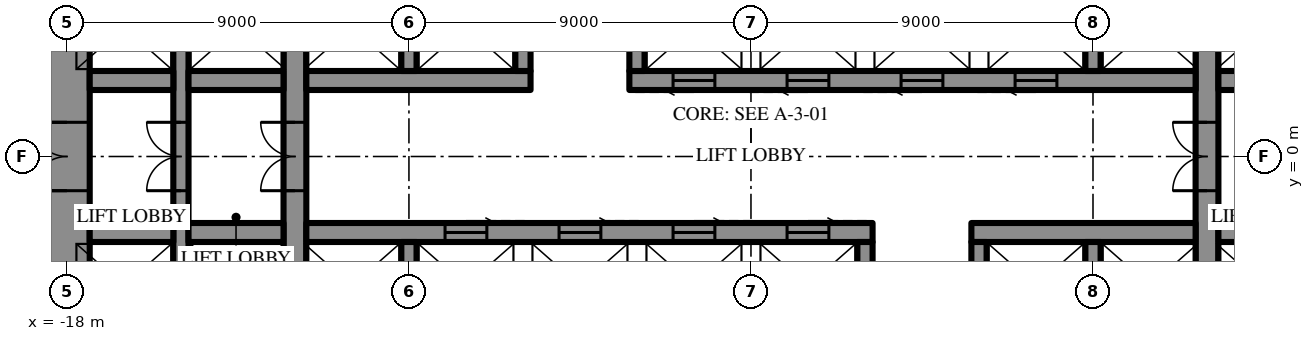
"""IFC4 building model, lengths in metres.
Left out: names, types, materials, properties, quantities, classifications, styles, units other than length and angle.
Written with IfcOpenShell. Run it as: python <this file> out.ifc"""

import sys

from ifc_helpers import new_model, si_unit, direction, frame, frame_2d, origin, place, context, subcontext, project, spatial, rectangle, extrude, element, fill, save


model = new_model("IFC4")
c1 = context("Model", 3, precision=1e-05, world=origin(), true_north=direction((0.0, 1.0)))
c2 = subcontext(c1, "Body", "Model", "MODEL_VIEW")
j1 = project(units=[si_unit("LENGTHUNIT", "METRE"), si_unit("PLANEANGLEUNIT", "RADIAN")], contexts=[c1])
p1 = place(None, origin())
s1 = spatial("IfcSite", under=j1, at=p1, CompositionType="ELEMENT")
p2 = place(p1, origin())
s2 = spatial("IfcBuilding", under=s1, at=p2, CompositionType="ELEMENT")
p3 = place(p2, frame((0.0, 0.0, 48.7)))
s3 = spatial("IfcBuildingStorey", under=s2, at=p3, CompositionType="ELEMENT", Elevation=48.7)
p4 = place(p3, frame((-18.0, 10.7, 0.0), z_axis=(0.0, 0.0, 1.0), x_axis=(0.0, -1.0, 0.0)))
e1 = element("IfcWall", 1, at=p4, inside=s3, PredefinedType="SHEAR", context=c2, shape_type="SweptSolid", body=[
    extrude(rectangle(XDim=21.4, YDim=1.2, at=frame_2d((10.7, 0.0))), origin(), (0.0, 0.0, 1.0), 4.2),
])
p5 = place(p4, frame((9.8, 0.0, 0.0)))
e2 = element("IfcOpeningElement", 2, at=p5, cuts=e1, PredefinedType="OPENING", context=c2, shape_type="SweptSolid", body=[
    extrude(rectangle(XDim=1.8, YDim=2.4, at=frame_2d((0.9, 1.2))), frame((0.0, 0.61, 0.0), z_axis=(0.0, -1.0, 0.0), x_axis=(1.0, 0.0, 0.0)), (0.0, 0.0, 1.0), 1.22),
])
p6 = place(p3, frame((12.0, -10.7, 0.0), z_axis=(0.0, 0.0, 1.0), x_axis=(0.0, 1.0, 0.0)))
e3 = element("IfcWall", 3, at=p6, inside=s3, PredefinedType="SHEAR", context=c2, shape_type="SweptSolid", body=[
    extrude(rectangle(XDim=21.4, YDim=0.6, at=frame_2d((10.7, 0.0))), origin(), (0.0, 0.0, 1.0), 4.2),
])
p7 = place(p6, frame((9.8, 0.0, 0.0)))
e4 = element("IfcOpeningElement", 4, at=p7, cuts=e3, PredefinedType="OPENING", context=c2, shape_type="SweptSolid", body=[
    extrude(rectangle(XDim=1.8, YDim=2.4, at=frame_2d((0.9, 1.2))), frame((0.0, 0.31, 0.0), z_axis=(0.0, -1.0, 0.0), x_axis=(1.0, 0.0, 0.0)), (0.0, 0.0, 1.0), 0.62),
])
p8 = place(p3, frame((-12.0, -10.7, 0.0), z_axis=(0.0, 0.0, 1.0), x_axis=(0.0, 1.0, 0.0)))
e5 = element("IfcWall", 5, at=p8, inside=s3, PredefinedType="SHEAR", context=c2, shape_type="SweptSolid", body=[
    extrude(rectangle(XDim=21.4, YDim=0.6, at=frame_2d((10.7, 0.0))), origin(), (0.0, 0.0, 1.0), 4.2),
])
p9 = place(p8, frame((9.8, 0.0, 0.0)))
e6 = element("IfcOpeningElement", 6, at=p9, cuts=e5, PredefinedType="OPENING", context=c2, shape_type="SweptSolid", body=[
    extrude(rectangle(XDim=1.8, YDim=2.4, at=frame_2d((0.9, 1.2))), frame((0.0, 0.31, 0.0), z_axis=(0.0, -1.0, 0.0), x_axis=(1.0, 0.0, 0.0)), (0.0, 0.0, 1.0), 0.62),
])
p10 = place(p3, frame((-15.0, -10.7, 0.0), z_axis=(0.0, 0.0, 1.0), x_axis=(0.0, 1.0, 0.0)))
e7 = element("IfcWall", 7, at=p10, inside=s3, PredefinedType="SHEAR", context=c2, shape_type="SweptSolid", body=[
    extrude(rectangle(XDim=21.4, YDim=0.4, at=frame_2d((10.7, 0.0))), origin(), (0.0, 0.0, 1.0), 4.2),
])
p11 = place(p10, frame((9.8, 0.0, 0.0)))
e8 = element("IfcOpeningElement", 8, at=p11, cuts=e7, PredefinedType="OPENING", context=c2, shape_type="SweptSolid", body=[
    extrude(rectangle(XDim=1.8, YDim=2.4, at=frame_2d((0.9, 1.2))), frame((0.0, 0.21, 0.0), z_axis=(0.0, -1.0, 0.0), x_axis=(1.0, 0.0, 0.0)), (0.0, 0.0, 1.0), 0.42),
])
p12 = place(p3, frame((-17.4, 2.0, 0.0), z_axis=(0.0, 0.0, 1.0), x_axis=(1.0, 0.0, 0.0)))
e9 = element("IfcWall", 9, at=p12, inside=s3, PredefinedType="SHEAR", context=c2, shape_type="SweptSolid", body=[
    extrude(rectangle(XDim=2.2, YDim=0.5, at=frame_2d((1.1, 0.0))), origin(), (0.0, 0.0, 1.0), 4.2),
])
p13 = place(p3, frame((-14.8, 2.0, 0.0), z_axis=(0.0, 0.0, 1.0), x_axis=(1.0, 0.0, 0.0)))
e10 = element("IfcWall", 10, at=p13, inside=s3, PredefinedType="SHEAR", context=c2, shape_type="SweptSolid", body=[
    extrude(rectangle(XDim=2.5, YDim=0.5, at=frame_2d((1.25, 0.0))), origin(), (0.0, 0.0, 1.0), 4.2),
])
p14 = place(p3, frame((-11.7, 2.0, 0.0), z_axis=(0.0, 0.0, 1.0), x_axis=(1.0, 0.0, 0.0)))
e11 = element("IfcWall", 11, at=p14, inside=s3, PredefinedType="SHEAR", context=c2, shape_type="SweptSolid", body=[
    extrude(rectangle(XDim=5.9, YDim=0.5, at=frame_2d((2.95, 0.0))), origin(), (0.0, 0.0, 1.0), 4.2),
])
p15 = place(p3, frame((-3.2, 2.0, 0.0), z_axis=(0.0, 0.0, 1.0), x_axis=(1.0, 0.0, 0.0)))
e12 = element("IfcWall", 12, at=p15, inside=s3, PredefinedType="SHEAR", context=c2, shape_type="SweptSolid", body=[
    extrude(rectangle(XDim=14.9, YDim=0.5, at=frame_2d((7.45, 0.0))), origin(), (0.0, 0.0, 1.0), 4.2),
])
p16 = place(p15, frame((1.15, 0.0, 0.0)))
e13 = element("IfcOpeningElement", 13, at=p16, cuts=e12, PredefinedType="OPENING", context=c2, shape_type="SweptSolid", body=[
    extrude(rectangle(XDim=1.1, YDim=2.2, at=frame_2d((0.55, 1.1))), frame((0.0, 0.26, 0.0), z_axis=(0.0, -1.0, 0.0), x_axis=(1.0, 0.0, 0.0)), (0.0, 0.0, 1.0), 0.52),
])
p17 = place(p15, frame((4.15, 0.0, 0.0)))
e14 = element("IfcOpeningElement", 14, at=p17, cuts=e12, PredefinedType="OPENING", context=c2, shape_type="SweptSolid", body=[
    extrude(rectangle(XDim=1.1, YDim=2.2, at=frame_2d((0.55, 1.1))), frame((0.0, 0.26, 0.0), z_axis=(0.0, -1.0, 0.0), x_axis=(1.0, 0.0, 0.0)), (0.0, 0.0, 1.0), 0.52),
])
p18 = place(p15, frame((7.15, 0.0, 0.0)))
e15 = element("IfcOpeningElement", 15, at=p18, cuts=e12, PredefinedType="OPENING", context=c2, shape_type="SweptSolid", body=[
    extrude(rectangle(XDim=1.1, YDim=2.2, at=frame_2d((0.55, 1.1))), frame((0.0, 0.26, 0.0), z_axis=(0.0, -1.0, 0.0), x_axis=(1.0, 0.0, 0.0)), (0.0, 0.0, 1.0), 0.52),
])
p19 = place(p15, frame((10.15, 0.0, 0.0)))
e16 = element("IfcOpeningElement", 16, at=p19, cuts=e12, PredefinedType="OPENING", context=c2, shape_type="SweptSolid", body=[
    extrude(rectangle(XDim=1.1, YDim=2.2, at=frame_2d((0.55, 1.1))), frame((0.0, 0.26, 0.0), z_axis=(0.0, -1.0, 0.0), x_axis=(1.0, 0.0, 0.0)), (0.0, 0.0, 1.0), 0.52),
])
p20 = place(p3, frame((12.3, 2.0, 0.0), z_axis=(0.0, 0.0, 1.0), x_axis=(1.0, 0.0, 0.0)))
e17 = element("IfcWall", 17, at=p20, inside=s3, PredefinedType="SHEAR", context=c2, shape_type="SweptSolid", body=[
    extrude(rectangle(XDim=2.5, YDim=0.5, at=frame_2d((1.25, 0.0))), origin(), (0.0, 0.0, 1.0), 4.2),
])
for number, where, z_axis, x_axis in (
    (18, (-9.0, 2.25, 0.0), (0.0, 0.0, 1.0), (0.0, 1.0, 0.0)),
    (19, (-6.0, 2.25, 0.0), (0.0, 0.0, 1.0), (0.0, 1.0, 0.0)),
    (20, (-3.0, 2.25, 0.0), (0.0, 0.0, 1.0), (0.0, 1.0, 0.0)),
    (21, (9.0, 2.25, 0.0), (0.0, 0.0, 1.0), (0.0, 1.0, 0.0)),
):
    element("IfcWall", number, at=place(p3, frame(where, z_axis=z_axis, x_axis=x_axis)), inside=s3, PredefinedType="SHEAR", context=c2, shape_type="SweptSolid", body=[
        extrude(rectangle(XDim=2.3, YDim=0.4, at=frame_2d((1.15, 0.0))), origin(), (0.0, 0.0, 1.0), 4.2),
    ])
p21 = place(p3, frame((14.8, -2.0, 0.0), z_axis=(0.0, 0.0, 1.0), x_axis=(-1.0, 0.0, 0.0)))
e22 = element("IfcWall", 22, at=p21, inside=s3, PredefinedType="SHEAR", context=c2, shape_type="SweptSolid", body=[
    extrude(rectangle(XDim=2.5, YDim=0.5, at=frame_2d((1.25, 0.0))), origin(), (0.0, 0.0, 1.0), 4.2),
])
p22 = place(p3, frame((11.7, -2.0, 0.0), z_axis=(0.0, 0.0, 1.0), x_axis=(-1.0, 0.0, 0.0)))
e23 = element("IfcWall", 23, at=p22, inside=s3, PredefinedType="SHEAR", context=c2, shape_type="SweptSolid", body=[
    extrude(rectangle(XDim=5.9, YDim=0.5, at=frame_2d((2.95, 0.0))), origin(), (0.0, 0.0, 1.0), 4.2),
])
p23 = place(p3, frame((3.2, -2.0, 0.0), z_axis=(0.0, 0.0, 1.0), x_axis=(-1.0, 0.0, 0.0)))
e24 = element("IfcWall", 24, at=p23, inside=s3, PredefinedType="SHEAR", context=c2, shape_type="SweptSolid", body=[
    extrude(rectangle(XDim=14.9, YDim=0.5, at=frame_2d((7.45, 0.0))), origin(), (0.0, 0.0, 1.0), 4.2),
])
p24 = place(p23, frame((1.15, 0.0, 0.0)))
e25 = element("IfcOpeningElement", 25, at=p24, cuts=e24, PredefinedType="OPENING", context=c2, shape_type="SweptSolid", body=[
    extrude(rectangle(XDim=1.1, YDim=2.2, at=frame_2d((0.55, 1.1))), frame((0.0, 0.26, 0.0), z_axis=(0.0, -1.0, 0.0), x_axis=(1.0, 0.0, 0.0)), (0.0, 0.0, 1.0), 0.52),
])
p25 = place(p23, frame((4.15, 0.0, 0.0)))
e26 = element("IfcOpeningElement", 26, at=p25, cuts=e24, PredefinedType="OPENING", context=c2, shape_type="SweptSolid", body=[
    extrude(rectangle(XDim=1.1, YDim=2.2, at=frame_2d((0.55, 1.1))), frame((0.0, 0.26, 0.0), z_axis=(0.0, -1.0, 0.0), x_axis=(1.0, 0.0, 0.0)), (0.0, 0.0, 1.0), 0.52),
])
p26 = place(p23, frame((7.15, 0.0, 0.0)))
e27 = element("IfcOpeningElement", 27, at=p26, cuts=e24, PredefinedType="OPENING", context=c2, shape_type="SweptSolid", body=[
    extrude(rectangle(XDim=1.1, YDim=2.2, at=frame_2d((0.55, 1.1))), frame((0.0, 0.26, 0.0), z_axis=(0.0, -1.0, 0.0), x_axis=(1.0, 0.0, 0.0)), (0.0, 0.0, 1.0), 0.52),
])
p27 = place(p23, frame((10.15, 0.0, 0.0)))
e28 = element("IfcOpeningElement", 28, at=p27, cuts=e24, PredefinedType="OPENING", context=c2, shape_type="SweptSolid", body=[
    extrude(rectangle(XDim=1.1, YDim=2.2, at=frame_2d((0.55, 1.1))), frame((0.0, 0.26, 0.0), z_axis=(0.0, -1.0, 0.0), x_axis=(1.0, 0.0, 0.0)), (0.0, 0.0, 1.0), 0.52),
])
p28 = place(p3, frame((-12.3, -2.0, 0.0), z_axis=(0.0, 0.0, 1.0), x_axis=(-1.0, 0.0, 0.0)))
e29 = element("IfcWall", 29, at=p28, inside=s3, PredefinedType="SHEAR", context=c2, shape_type="SweptSolid", body=[
    extrude(rectangle(XDim=2.5, YDim=0.5, at=frame_2d((1.25, 0.0))), origin(), (0.0, 0.0, 1.0), 4.2),
])
p29 = place(p3, frame((-15.2, -2.0, 0.0), z_axis=(0.0, 0.0, 1.0), x_axis=(-1.0, 0.0, 0.0)))
e30 = element("IfcWall", 30, at=p29, inside=s3, PredefinedType="SHEAR", context=c2, shape_type="SweptSolid", body=[
    extrude(rectangle(XDim=2.2, YDim=0.5, at=frame_2d((1.1, 0.0))), origin(), (0.0, 0.0, 1.0), 4.2),
])
for number, where, z_axis, x_axis in (
    (31, (9.0, -2.25, 0.0), (0.0, 0.0, 1.0), (0.0, -1.0, 0.0)),
    (32, (6.0, -2.25, 0.0), (0.0, 0.0, 1.0), (0.0, -1.0, 0.0)),
    (33, (3.0, -2.25, 0.0), (0.0, 0.0, 1.0), (0.0, -1.0, 0.0)),
    (34, (-9.0, -2.25, 0.0), (0.0, 0.0, 1.0), (0.0, -1.0, 0.0)),
):
    element("IfcWall", number, at=place(p3, frame(where, z_axis=z_axis, x_axis=x_axis)), inside=s3, PredefinedType="SHEAR", context=c2, shape_type="SweptSolid", body=[
        extrude(rectangle(XDim=2.3, YDim=0.4, at=frame_2d((1.15, 0.0))), origin(), (0.0, 0.0, 1.0), 4.2),
    ])
p30 = place(p5, frame((1.8, 0.0, 0.0), z_axis=(0.0, 0.0, 1.0), x_axis=(-1.0, 0.0, 0.0)))
e35 = element("IfcDoor", 35, at=p30, inside=s3, OperationType="DOUBLE_DOOR_SINGLE_SWING", PredefinedType="DOOR", context=c2, shape_type="SweptSolid", body=[
    extrude(rectangle(XDim=1.8, YDim=2.4, at=frame_2d((0.9, 1.2))), frame((0.0, 0.025, 0.0), z_axis=(0.0, -1.0, 0.0), x_axis=(1.0, 0.0, 0.0)), (0.0, 0.0, 1.0), 0.05),
])
fill(e2, e35)
p31 = place(p7, origin())
e36 = element("IfcDoor", 36, at=p31, inside=s3, OperationType="DOUBLE_DOOR_SINGLE_SWING", PredefinedType="DOOR", context=c2, shape_type="SweptSolid", body=[
    extrude(rectangle(XDim=1.8, YDim=2.4, at=frame_2d((0.9, 1.2))), frame((0.0, 0.025, 0.0), z_axis=(0.0, -1.0, 0.0), x_axis=(1.0, 0.0, 0.0)), (0.0, 0.0, 1.0), 0.05),
])
fill(e4, e36)
p32 = place(p9, origin())
e37 = element("IfcDoor", 37, at=p32, inside=s3, OperationType="DOUBLE_DOOR_SINGLE_SWING", PredefinedType="DOOR", context=c2, shape_type="SweptSolid", body=[
    extrude(rectangle(XDim=1.8, YDim=2.4, at=frame_2d((0.9, 1.2))), frame((0.0, 0.025, 0.0), z_axis=(0.0, -1.0, 0.0), x_axis=(1.0, 0.0, 0.0)), (0.0, 0.0, 1.0), 0.05),
])
fill(e6, e37)
p33 = place(p11, origin())
e38 = element("IfcDoor", 38, at=p33, inside=s3, OperationType="DOUBLE_DOOR_SINGLE_SWING", PredefinedType="DOOR", context=c2, shape_type="SweptSolid", body=[
    extrude(rectangle(XDim=1.8, YDim=2.4, at=frame_2d((0.9, 1.2))), frame((0.0, 0.025, 0.0), z_axis=(0.0, -1.0, 0.0), x_axis=(1.0, 0.0, 0.0)), (0.0, 0.0, 1.0), 0.05),
])
fill(e8, e38)
p34 = place(p16, frame((1.1, 0.0, 0.0), z_axis=(0.0, 0.0, 1.0), x_axis=(-1.0, 0.0, 0.0)))
e39 = element("IfcDoor", 39, at=p34, inside=s3, OperationType="SLIDING_TO_LEFT", PredefinedType="DOOR", context=c2, shape_type="SweptSolid", body=[
    extrude(rectangle(XDim=1.1, YDim=2.2, at=frame_2d((0.55, 1.1))), frame((0.0, 0.025, 0.0), z_axis=(0.0, -1.0, 0.0), x_axis=(1.0, 0.0, 0.0)), (0.0, 0.0, 1.0), 0.05),
])
fill(e13, e39)
p35 = place(p17, frame((1.1, 0.0, 0.0), z_axis=(0.0, 0.0, 1.0), x_axis=(-1.0, 0.0, 0.0)))
e40 = element("IfcDoor", 40, at=p35, inside=s3, OperationType="SLIDING_TO_LEFT", PredefinedType="DOOR", context=c2, shape_type="SweptSolid", body=[
    extrude(rectangle(XDim=1.1, YDim=2.2, at=frame_2d((0.55, 1.1))), frame((0.0, 0.025, 0.0), z_axis=(0.0, -1.0, 0.0), x_axis=(1.0, 0.0, 0.0)), (0.0, 0.0, 1.0), 0.05),
])
fill(e14, e40)
p36 = place(p18, frame((1.1, 0.0, 0.0), z_axis=(0.0, 0.0, 1.0), x_axis=(-1.0, 0.0, 0.0)))
e41 = element("IfcDoor", 41, at=p36, inside=s3, OperationType="SLIDING_TO_LEFT", PredefinedType="DOOR", context=c2, shape_type="SweptSolid", body=[
    extrude(rectangle(XDim=1.1, YDim=2.2, at=frame_2d((0.55, 1.1))), frame((0.0, 0.025, 0.0), z_axis=(0.0, -1.0, 0.0), x_axis=(1.0, 0.0, 0.0)), (0.0, 0.0, 1.0), 0.05),
])
fill(e15, e41)
p37 = place(p19, frame((1.1, 0.0, 0.0), z_axis=(0.0, 0.0, 1.0), x_axis=(-1.0, 0.0, 0.0)))
e42 = element("IfcDoor", 42, at=p37, inside=s3, OperationType="SLIDING_TO_LEFT", PredefinedType="DOOR", context=c2, shape_type="SweptSolid", body=[
    extrude(rectangle(XDim=1.1, YDim=2.2, at=frame_2d((0.55, 1.1))), frame((0.0, 0.025, 0.0), z_axis=(0.0, -1.0, 0.0), x_axis=(1.0, 0.0, 0.0)), (0.0, 0.0, 1.0), 0.05),
])
fill(e16, e42)
p38 = place(p24, frame((1.1, 0.0, 0.0), z_axis=(0.0, 0.0, 1.0), x_axis=(-1.0, 0.0, 0.0)))
e43 = element("IfcDoor", 43, at=p38, inside=s3, OperationType="SLIDING_TO_LEFT", PredefinedType="DOOR", context=c2, shape_type="SweptSolid", body=[
    extrude(rectangle(XDim=1.1, YDim=2.2, at=frame_2d((0.55, 1.1))), frame((0.0, 0.025, 0.0), z_axis=(0.0, -1.0, 0.0), x_axis=(1.0, 0.0, 0.0)), (0.0, 0.0, 1.0), 0.05),
])
fill(e25, e43)
p39 = place(p25, frame((1.1, 0.0, 0.0), z_axis=(0.0, 0.0, 1.0), x_axis=(-1.0, 0.0, 0.0)))
e44 = element("IfcDoor", 44, at=p39, inside=s3, OperationType="SLIDING_TO_LEFT", PredefinedType="DOOR", context=c2, shape_type="SweptSolid", body=[
    extrude(rectangle(XDim=1.1, YDim=2.2, at=frame_2d((0.55, 1.1))), frame((0.0, 0.025, 0.0), z_axis=(0.0, -1.0, 0.0), x_axis=(1.0, 0.0, 0.0)), (0.0, 0.0, 1.0), 0.05),
])
fill(e26, e44)
p40 = place(p26, frame((1.1, 0.0, 0.0), z_axis=(0.0, 0.0, 1.0), x_axis=(-1.0, 0.0, 0.0)))
e45 = element("IfcDoor", 45, at=p40, inside=s3, OperationType="SLIDING_TO_LEFT", PredefinedType="DOOR", context=c2, shape_type="SweptSolid", body=[
    extrude(rectangle(XDim=1.1, YDim=2.2, at=frame_2d((0.55, 1.1))), frame((0.0, 0.025, 0.0), z_axis=(0.0, -1.0, 0.0), x_axis=(1.0, 0.0, 0.0)), (0.0, 0.0, 1.0), 0.05),
])
fill(e27, e45)
p41 = place(p27, frame((1.1, 0.0, 0.0), z_axis=(0.0, 0.0, 1.0), x_axis=(-1.0, 0.0, 0.0)))
e46 = element("IfcDoor", 46, at=p41, inside=s3, OperationType="SLIDING_TO_LEFT", PredefinedType="DOOR", context=c2, shape_type="SweptSolid", body=[
    extrude(rectangle(XDim=1.1, YDim=2.2, at=frame_2d((0.55, 1.1))), frame((0.0, 0.025, 0.0), z_axis=(0.0, -1.0, 0.0), x_axis=(1.0, 0.0, 0.0)), (0.0, 0.0, 1.0), 0.05),
])
fill(e28, e46)
save(model, sys.argv[1])
